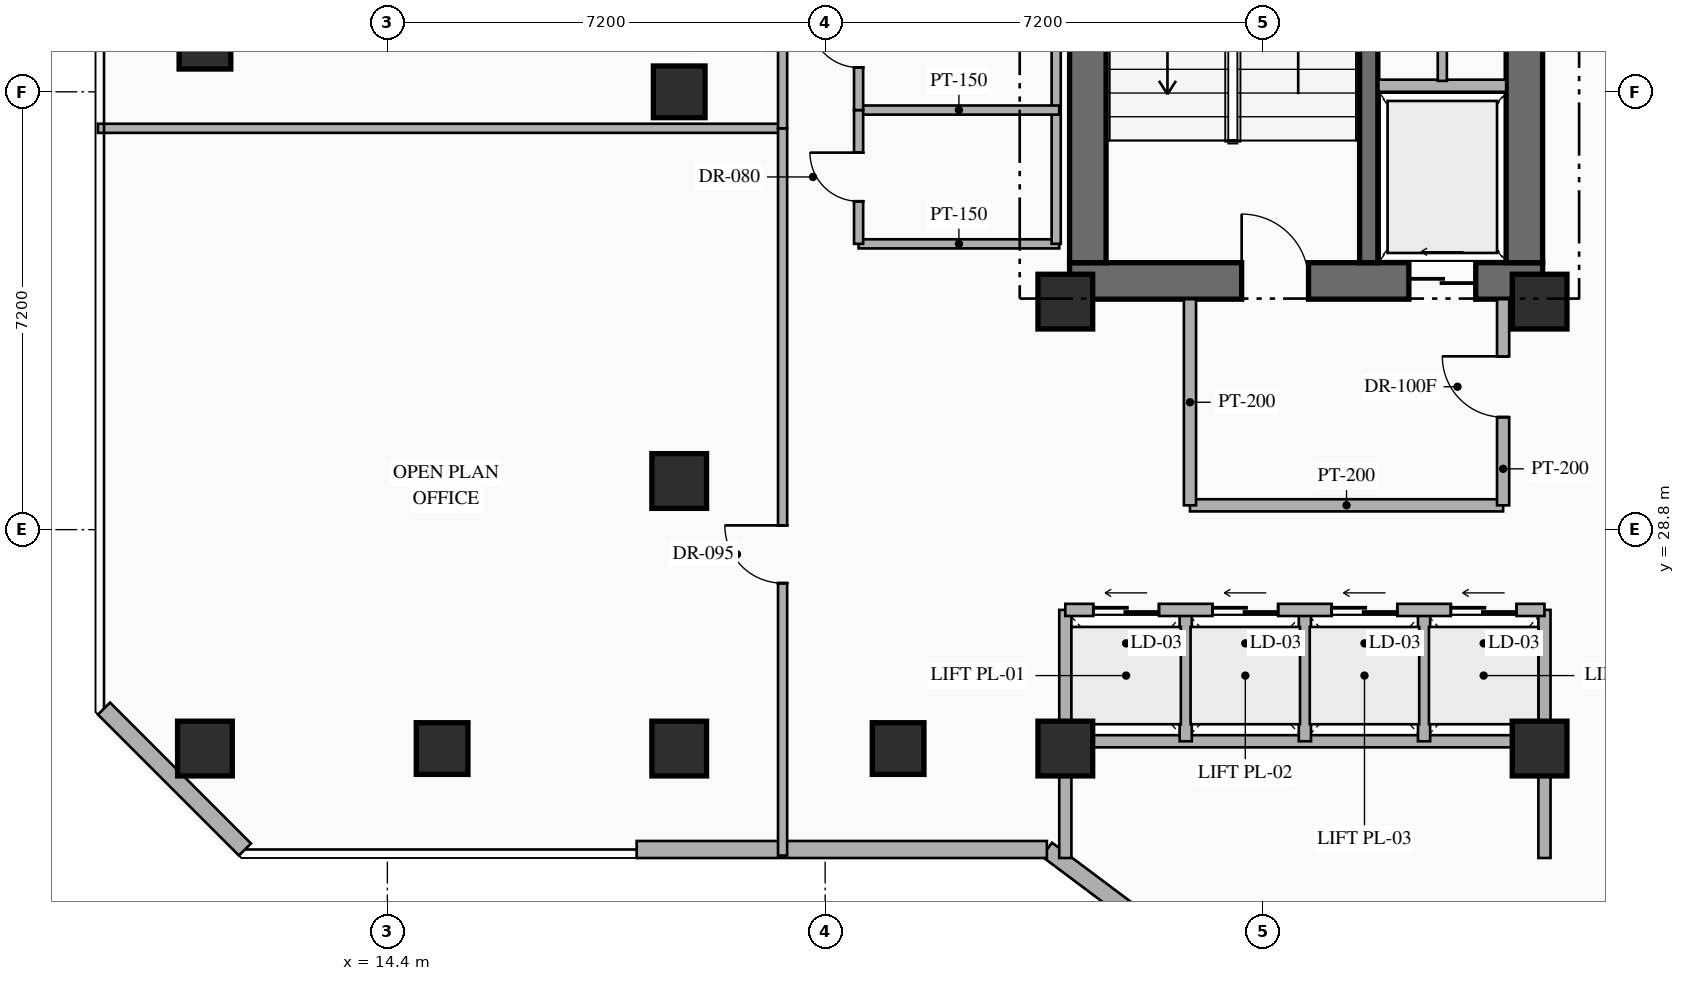
"""IFC4 building model, lengths in metres.
Left out: names, types, materials, properties, quantities, classifications, styles, units other than length and angle.
Written with IfcOpenShell. Run it as: python <this file> out.ifc"""

import sys

from ifc_helpers import new_model, si_unit, direction, frame, frame_2d, origin, origin_2d, place, context, subcontext, project, spatial, rectangle, hollow_rectangle, extrude, element, fill, save


model = new_model("IFC4")
c1 = context("Model", 3, precision=1e-05, world=origin(), true_north=direction((0.0, 1.0)))
c2 = subcontext(c1, "Body", "Model", "MODEL_VIEW")
j1 = project(units=[si_unit("LENGTHUNIT", "METRE"), si_unit("PLANEANGLEUNIT", "RADIAN")], contexts=[c1])
p1 = place(None, origin())
s1 = spatial("IfcSite", under=j1, at=p1, CompositionType="ELEMENT")
p2 = place(p1, origin())
s2 = spatial("IfcBuilding", under=s1, at=p2, CompositionType="ELEMENT")
p3 = place(p2, frame((0.0, 0.0, 96.45)))
s3 = spatial("IfcBuildingStorey", under=s2, at=p3, CompositionType="ELEMENT", Elevation=96.45)
p4 = place(p3, frame((25.62, 32.89, 0.0), z_axis=(0.0, 0.0, 1.0), x_axis=(1.0, 0.0, 0.0)))
e1 = element("IfcWall", 1, at=p4, inside=s3, PredefinedType="SHEAR", context=c2, shape_type="SweptSolid", body=[
    extrude(rectangle(XDim=7.78, YDim=0.6, at=frame_2d((3.89, 0.0))), origin(), (0.0, 0.0, 1.0), 4.8),
])
p5 = place(p4, frame((2.83, 0.0, 0.0)))
e2 = element("IfcOpeningElement", 2, at=p5, cuts=e1, PredefinedType="OPENING", context=c2, shape_type="SweptSolid", body=[
    extrude(rectangle(XDim=1.1, YDim=2.2, at=frame_2d((0.55, 1.1))), frame((0.0, 0.31, 0.0), z_axis=(0.0, -1.0, 0.0), x_axis=(1.0, 0.0, 0.0)), (0.0, 0.0, 1.0), 0.62),
])
p6 = place(p4, frame((5.58, 0.0, 0.0)))
e3 = element("IfcOpeningElement", 3, at=p6, cuts=e1, PredefinedType="OPENING", context=c2, shape_type="SweptSolid", body=[
    extrude(rectangle(XDim=1.1, YDim=2.15, at=frame_2d((0.55, 1.075))), frame((0.0, 0.31, 0.0), z_axis=(0.0, -1.0, 0.0), x_axis=(1.0, 0.0, 0.0)), (0.0, 0.0, 1.0), 0.62),
])
p7 = place(p3, frame((25.92, 33.19, 0.0), z_axis=(0.0, 0.0, 1.0), x_axis=(0.0, 1.0, 0.0)))
e4 = element("IfcWall", 4, at=p7, inside=s3, PredefinedType="SHEAR", context=c2, shape_type="SweptSolid", body=[
    extrude(rectangle(XDim=9.48, YDim=0.6, at=frame_2d((4.74, 0.0))), origin(), (0.0, 0.0, 1.0), 4.8),
])
p8 = place(p3, frame((33.1, 33.19, 0.0), z_axis=(0.0, 0.0, 1.0), x_axis=(0.0, 1.0, 0.0)))
e5 = element("IfcWall", 5, at=p8, inside=s3, PredefinedType="SHEAR", context=c2, shape_type="SweptSolid", body=[
    extrude(rectangle(XDim=9.48, YDim=0.6, at=frame_2d((4.74, 0.0))), origin(), (0.0, 0.0, 1.0), 4.8),
])
p9 = place(p8, frame((4.71, 0.0, 0.0)))
e6 = element("IfcOpeningElement", 6, at=p9, cuts=e5, PredefinedType="OPENING", context=c2, shape_type="SweptSolid", body=[
    extrude(rectangle(XDim=0.85, YDim=2.08, at=frame_2d((0.425, 1.04))), frame((0.0, 0.31, 0.0), z_axis=(0.0, -1.0, 0.0), x_axis=(1.0, 0.0, 0.0)), (0.0, 0.0, 1.0), 0.62),
])
p10 = place(p8, frame((7.76, 0.0, 0.0)))
e7 = element("IfcOpeningElement", 7, at=p10, cuts=e5, PredefinedType="OPENING", context=c2, shape_type="SweptSolid", body=[
    extrude(rectangle(XDim=0.85, YDim=2.08, at=frame_2d((0.425, 1.04))), frame((0.0, 0.31, 0.0), z_axis=(0.0, -1.0, 0.0), x_axis=(1.0, 0.0, 0.0)), (0.0, 0.0, 1.0), 0.62),
])
p11 = place(p3, frame((30.54, 33.19, 0.0), z_axis=(0.0, 0.0, 1.0), x_axis=(0.0, 1.0, 0.0)))
e8 = element("IfcWall", 8, at=p11, inside=s3, PredefinedType="SHEAR", context=c2, shape_type="SweptSolid", body=[
    extrude(rectangle(XDim=9.48, YDim=0.3, at=frame_2d((4.74, 0.0))), origin(), (0.0, 0.0, 1.0), 4.8),
])
for number, where, z_axis, x_axis in (
    (9, (25.55, 32.55, 0.0), (0.0, 0.0, 1.0), (1.0, 0.0, 0.0)),
    (10, (33.35, 32.55, 0.0), (0.0, 0.0, 1.0), (1.0, 0.0, 0.0)),
):
    element("IfcColumn", number, at=place(p3, frame(where, z_axis=z_axis, x_axis=x_axis)), inside=s3, PredefinedType="COLUMN", context=c2, shape_type="SweptSolid", body=[
        extrude(rectangle(XDim=0.9, YDim=0.9, at=origin_2d()), origin(), (0.0, 0.0, 1.0), 4.8),
    ])
for number, where, z_axis, x_axis in (
    (11, (25.55, 25.2, 0.0), (0.0, 0.0, 1.0), (1.0, 0.0, 0.0)),
    (12, (33.35, 25.2, 0.0), (0.0, 0.0, 1.0), (1.0, 0.0, 0.0)),
    (13, (11.4, 25.2, 0.0), (0.0, 0.0, 1.0), (1.0, 0.0, 0.0)),
    (14, (19.2, 25.2, 0.0), (0.0, 0.0, 1.0), (1.0, 0.0, 0.0)),
    (15, (19.2, 29.6, 0.0), (0.0, 0.0, 1.0), (1.0, 0.0, 0.0)),
):
    element("IfcColumn", number, at=place(p3, frame(where, z_axis=z_axis, x_axis=x_axis)), inside=s3, PredefinedType="COLUMN", context=c2, shape_type="SweptSolid", body=[
        extrude(hollow_rectangle(XDim=0.9, YDim=0.9, WallThickness=0.036, at=origin_2d()), origin(), (0.0, 0.0, 1.0), 4.8),
    ])
for number, where, z_axis, x_axis in (
    (16, (22.8, 25.2, 0.0), (0.0, 0.0, 1.0), (1.0, 0.0, 0.0)),
    (17, (11.4, 36.8, 0.0), (0.0, 0.0, 1.0), (1.0, 0.0, 0.0)),
    (18, (19.2, 36.0, 0.0), (0.0, 0.0, 1.0), (1.0, 0.0, 0.0)),
    (19, (15.3, 25.2, 0.0), (0.0, 0.0, 1.0), (1.0, 0.0, 0.0)),
):
    element("IfcColumn", number, at=place(p3, frame(where, z_axis=z_axis, x_axis=x_axis)), inside=s3, PredefinedType="COLUMN", context=c2, shape_type="SweptSolid", body=[
        extrude(hollow_rectangle(XDim=0.85, YDim=0.85, WallThickness=0.032, at=origin_2d()), origin(), (0.0, 0.0, 1.0), 4.8),
    ])
p12 = place(p3, frame((53.318, 2.487, 0.0), z_axis=(0.0, 0.0, 1.0), x_axis=(-0.800004174678, 0.599994433723, 0.0)))
e20 = element("IfcWall", 20, at=p12, inside=s3, PredefinedType="STANDARD", context=c2, shape_type="SweptSolid", body=[
    extrude(rectangle(XDim=35.089, YDim=0.28, at=frame_2d((17.544, 0.0))), origin(), (0.0, 0.0, 1.0), 4.55),
])
p13 = place(p3, frame((25.247, 23.54, 0.0), z_axis=(0.0, 0.0, 1.0), x_axis=(-1.0, 0.0, 0.0)))
e21 = element("IfcWall", 21, at=p13, inside=s3, PredefinedType="STANDARD", context=c2, shape_type="SweptSolid", body=[
    extrude(rectangle(XDim=6.747, YDim=0.28, at=frame_2d((3.374, 0.0))), origin(), (0.0, 0.0, 1.0), 4.55),
])
p14 = place(p3, frame((12.058, 23.54, 0.0), z_axis=(0.0, 0.0, 1.0), x_axis=(-0.707144017911, 0.707069542501, 0.0)))
e22 = element("IfcWall", 22, at=p14, inside=s3, PredefinedType="STANDARD", context=c2, shape_type="SweptSolid", body=[
    extrude(rectangle(XDim=3.278, YDim=0.28, at=frame_2d((1.639, 0.0))), origin(), (0.0, 0.0, 1.0), 4.55),
])
p15 = place(p3, frame((30.7, 36.1, 0.0), z_axis=(0.0, 0.0, 1.0), x_axis=(1.0, 0.0, 0.0)))
e23 = element("IfcWall", 23, at=p15, inside=s3, PredefinedType="STANDARD", context=c2, shape_type="SweptSolid", body=[
    extrude(rectangle(XDim=2.1, YDim=0.2, at=frame_2d((1.05, 0.0))), origin(), (0.0, 0.0, 1.0), 4.55),
])
p16 = place(p3, frame((31.75, 36.18, 0.0), z_axis=(0.0, 0.0, 1.0), x_axis=(0.0, 1.0, 0.0)))
e24 = element("IfcWall", 24, at=p16, inside=s3, PredefinedType="PARTITIONING", context=c2, shape_type="SweptSolid", body=[
    extrude(rectangle(XDim=4.24, YDim=0.15, at=frame_2d((2.12, 0.0))), origin(), (0.0, 0.0, 1.0), 4.55),
])
p17 = place(p16, frame((1.695, 0.0, 0.0)))
e25 = element("IfcOpeningElement", 25, at=p17, cuts=e24, PredefinedType="OPENING", context=c2, shape_type="SweptSolid", body=[
    extrude(rectangle(XDim=0.85, YDim=2.08, at=frame_2d((0.425, 1.04))), frame((0.0, 0.085, 0.0), z_axis=(0.0, -1.0, 0.0), x_axis=(1.0, 0.0, 0.0)), (0.0, 0.0, 1.0), 0.17),
])
p18 = place(p3, frame((27.6, 29.2, 0.0), z_axis=(0.0, 0.0, 1.0), x_axis=(1.0, 0.0, 0.0)))
e26 = element("IfcWall", 26, at=p18, inside=s3, PredefinedType="STANDARD", context=c2, shape_type="SweptSolid", body=[
    extrude(rectangle(XDim=5.15, YDim=0.2, at=frame_2d((2.575, 0.0))), origin(), (0.0, 0.0, 1.0), 4.55),
])
p19 = place(p3, frame((27.6, 29.2, 0.0), z_axis=(0.0, 0.0, 1.0), x_axis=(0.0, 1.0, 0.0)))
e27 = element("IfcWall", 27, at=p19, inside=s3, PredefinedType="STANDARD", context=c2, shape_type="SweptSolid", body=[
    extrude(rectangle(XDim=3.39, YDim=0.2, at=frame_2d((1.695, 0.0))), origin(), (0.0, 0.0, 1.0), 4.55),
])
p20 = place(p3, frame((32.75, 29.2, 0.0), z_axis=(0.0, 0.0, 1.0), x_axis=(0.0, 1.0, 0.0)))
e28 = element("IfcWall", 28, at=p20, inside=s3, PredefinedType="STANDARD", context=c2, shape_type="SweptSolid", body=[
    extrude(rectangle(XDim=3.39, YDim=0.2, at=frame_2d((1.695, 0.0))), origin(), (0.0, 0.0, 1.0), 4.55),
])
p21 = place(p20, frame((1.45, 0.0, 0.0)))
e29 = element("IfcOpeningElement", 29, at=p21, cuts=e28, PredefinedType="OPENING", context=c2, shape_type="SweptSolid", body=[
    extrude(rectangle(XDim=1.0, YDim=2.2, at=frame_2d((0.5, 1.1))), frame((0.0, 0.11, 0.0), z_axis=(0.0, -1.0, 0.0), x_axis=(1.0, 0.0, 0.0)), (0.0, 0.0, 1.0), 0.22),
])
for number, where, z_axis, x_axis in (
    (30, (25.55, 23.4, 0.0), (0.0, 0.0, 1.0), (0.0, 1.0, 0.0)),
    (31, (33.43, 23.4, 0.0), (0.0, 0.0, 1.0), (0.0, 1.0, 0.0)),
):
    element("IfcWall", number, at=place(p3, frame(where, z_axis=z_axis, x_axis=x_axis)), inside=s3, PredefinedType="STANDARD", context=c2, shape_type="SweptSolid", body=[
        extrude(rectangle(XDim=4.08, YDim=0.2, at=frame_2d((2.04, 0.0))), origin(), (0.0, 0.0, 1.0), 3.745),
    ])
p22 = place(p3, frame((25.55, 25.32, 0.0), z_axis=(0.0, 0.0, 1.0), x_axis=(1.0, 0.0, 0.0)))
e32 = element("IfcWall", 32, at=p22, inside=s3, PredefinedType="STANDARD", context=c2, shape_type="SweptSolid", body=[
    extrude(rectangle(XDim=7.88, YDim=0.2, at=frame_2d((3.94, 0.0))), origin(), (0.0, 0.0, 1.0), 3.945),
])
for number, where, z_axis, x_axis in (
    (33, (27.53, 25.32, 0.0), (0.0, 0.0, 1.0), (0.0, 1.0, 0.0)),
    (34, (29.49, 25.32, 0.0), (0.0, 0.0, 1.0), (0.0, 1.0, 0.0)),
    (35, (31.45, 25.32, 0.0), (0.0, 0.0, 1.0), (0.0, 1.0, 0.0)),
):
    element("IfcWall", number, at=place(p3, frame(where, z_axis=z_axis, x_axis=x_axis)), inside=s3, PredefinedType="STANDARD", context=c2, shape_type="SweptSolid", body=[
        extrude(rectangle(XDim=2.16, YDim=0.2, at=frame_2d((1.08, 0.0))), origin(), (0.0, 0.0, 1.0), 4.55),
    ])
p23 = place(p3, frame((25.55, 27.48, 0.0), z_axis=(0.0, 0.0, 1.0), x_axis=(1.0, 0.0, 0.0)))
e36 = element("IfcWall", 36, at=p23, inside=s3, PredefinedType="STANDARD", context=c2, shape_type="SweptSolid", body=[
    extrude(rectangle(XDim=7.88, YDim=0.2, at=frame_2d((3.94, 0.0))), origin(), (0.0, 0.0, 1.0), 4.55),
])
p24 = place(p23, frame((0.46, 0.0, 0.0)))
e37 = element("IfcOpeningElement", 37, at=p24, cuts=e36, PredefinedType="OPENING", context=c2, shape_type="SweptSolid", body=[
    extrude(rectangle(XDim=1.08, YDim=2.15, at=frame_2d((0.54, 1.075))), frame((0.0, 0.11, 0.0), z_axis=(0.0, -1.0, 0.0), x_axis=(1.0, 0.0, 0.0)), (0.0, 0.0, 1.0), 0.22),
])
p25 = place(p23, frame((2.42, 0.0, 0.0)))
e38 = element("IfcOpeningElement", 38, at=p25, cuts=e36, PredefinedType="OPENING", context=c2, shape_type="SweptSolid", body=[
    extrude(rectangle(XDim=1.08, YDim=2.15, at=frame_2d((0.54, 1.075))), frame((0.0, 0.11, 0.0), z_axis=(0.0, -1.0, 0.0), x_axis=(1.0, 0.0, 0.0)), (0.0, 0.0, 1.0), 0.22),
])
p26 = place(p23, frame((4.38, 0.0, 0.0)))
e39 = element("IfcOpeningElement", 39, at=p26, cuts=e36, PredefinedType="OPENING", context=c2, shape_type="SweptSolid", body=[
    extrude(rectangle(XDim=1.08, YDim=2.15, at=frame_2d((0.54, 1.075))), frame((0.0, 0.11, 0.0), z_axis=(0.0, -1.0, 0.0), x_axis=(1.0, 0.0, 0.0)), (0.0, 0.0, 1.0), 0.22),
])
p27 = place(p23, frame((6.34, 0.0, 0.0)))
e40 = element("IfcOpeningElement", 40, at=p27, cuts=e36, PredefinedType="OPENING", context=c2, shape_type="SweptSolid", body=[
    extrude(rectangle(XDim=1.08, YDim=2.15, at=frame_2d((0.54, 1.075))), frame((0.0, 0.11, 0.0), z_axis=(0.0, -1.0, 0.0), x_axis=(1.0, 0.0, 0.0)), (0.0, 0.0, 1.0), 0.22),
])
p28 = place(p3, frame((22.15, 33.5, 0.0), z_axis=(0.0, 0.0, 1.0), x_axis=(1.0, 0.0, 0.0)))
e41 = element("IfcWall", 41, at=p28, inside=s3, PredefinedType="PARTITIONING", context=c2, shape_type="SweptSolid", body=[
    extrude(rectangle(XDim=3.3, YDim=0.15, at=frame_2d((1.65, 0.0))), origin(), (0.0, 0.0, 1.0), 4.55),
])
p29 = place(p3, frame((25.4, 33.5, 0.0), z_axis=(0.0, 0.0, 1.0), x_axis=(0.0, 1.0, 0.0)))
e42 = element("IfcWall", 42, at=p29, inside=s3, PredefinedType="PARTITIONING", context=c2, shape_type="SweptSolid", body=[
    extrude(rectangle(XDim=6.6, YDim=0.15, at=frame_2d((3.3, 0.0))), origin(), (0.0, 0.0, 1.0), 4.55),
])
p30 = place(p3, frame((22.15, 35.7, 0.0), z_axis=(0.0, 0.0, 1.0), x_axis=(1.0, 0.0, 0.0)))
e43 = element("IfcWall", 43, at=p30, inside=s3, PredefinedType="PARTITIONING", context=c2, shape_type="SweptSolid", body=[
    extrude(rectangle(XDim=3.3, YDim=0.15, at=frame_2d((1.65, 0.0))), origin(), (0.0, 0.0, 1.0), 4.55),
])
p31 = place(p3, frame((22.15, 33.5, 0.0), z_axis=(0.0, 0.0, 1.0), x_axis=(0.0, 1.0, 0.0)))
e44 = element("IfcWall", 44, at=p31, inside=s3, PredefinedType="PARTITIONING", context=c2, shape_type="SweptSolid", body=[
    extrude(rectangle(XDim=2.2, YDim=0.15, at=frame_2d((1.1, 0.0))), origin(), (0.0, 0.0, 1.0), 4.55),
])
p32 = place(p31, frame((0.7, 0.0, 0.0)))
e45 = element("IfcOpeningElement", 45, at=p32, cuts=e44, PredefinedType="OPENING", context=c2, shape_type="SweptSolid", body=[
    extrude(rectangle(XDim=0.8, YDim=2.06, at=frame_2d((0.4, 1.03))), frame((0.0, 0.085, 0.0), z_axis=(0.0, -1.0, 0.0), x_axis=(1.0, 0.0, 0.0)), (0.0, 0.0, 1.0), 0.17),
])
p33 = place(p3, frame((22.15, 35.7, 0.0), z_axis=(0.0, 0.0, 1.0), x_axis=(0.0, 1.0, 0.0)))
e46 = element("IfcWall", 46, at=p33, inside=s3, PredefinedType="PARTITIONING", context=c2, shape_type="SweptSolid", body=[
    extrude(rectangle(XDim=2.2, YDim=0.15, at=frame_2d((1.1, 0.0))), origin(), (0.0, 0.0, 1.0), 4.55),
])
p34 = place(p33, frame((0.7, 0.0, 0.0)))
e47 = element("IfcOpeningElement", 47, at=p34, cuts=e46, PredefinedType="OPENING", context=c2, shape_type="SweptSolid", body=[
    extrude(rectangle(XDim=0.8, YDim=2.06, at=frame_2d((0.4, 1.03))), frame((0.0, 0.085, 0.0), z_axis=(0.0, -1.0, 0.0), x_axis=(1.0, 0.0, 0.0)), (0.0, 0.0, 1.0), 0.17),
])
p35 = place(p3, frame((9.64, 35.4, 0.0), z_axis=(0.0, 0.0, 1.0), x_axis=(1.0, 0.0, 0.0)))
e48 = element("IfcWall", 48, at=p35, inside=s3, PredefinedType="PARTITIONING", context=c2, shape_type="SweptSolid", body=[
    extrude(rectangle(XDim=11.26, YDim=0.15, at=frame_2d((5.63, 0.0))), origin(), (0.0, 0.0, 1.0), 4.55),
])
p36 = place(p3, frame((20.9, 23.44, 0.0), z_axis=(0.0, 0.0, 1.0), x_axis=(0.0, 1.0, 0.0)))
e49 = element("IfcWall", 49, at=p36, inside=s3, PredefinedType="PARTITIONING", context=c2, shape_type="SweptSolid", body=[
    extrude(rectangle(XDim=11.96, YDim=0.15, at=frame_2d((5.98, 0.0))), origin(), (0.0, 0.0, 1.0), 4.55),
])
p37 = place(p36, frame((4.48, 0.0, 0.0)))
e50 = element("IfcOpeningElement", 50, at=p37, cuts=e49, PredefinedType="OPENING", context=c2, shape_type="SweptSolid", body=[
    extrude(rectangle(XDim=0.95, YDim=2.15, at=frame_2d((0.475, 1.075))), frame((0.0, 0.085, 0.0), z_axis=(0.0, -1.0, 0.0), x_axis=(1.0, 0.0, 0.0)), (0.0, 0.0, 1.0), 0.17),
])
p38 = place(p3, frame((20.9, 35.4, 0.0), z_axis=(0.0, 0.0, 1.0), x_axis=(0.0, 1.0, 0.0)))
e51 = element("IfcWall", 51, at=p38, inside=s3, PredefinedType="PARTITIONING", context=c2, shape_type="SweptSolid", body=[
    extrude(rectangle(XDim=14.96, YDim=0.15, at=frame_2d((7.48, 0.0))), origin(), (0.0, 0.0, 1.0), 4.55),
])
p39 = place(p38, frame((7.667, 0.0, 0.0)))
e52 = element("IfcOpeningElement", 52, at=p39, cuts=e51, PredefinedType="OPENING", context=c2, shape_type="SweptSolid", body=[
    extrude(rectangle(XDim=0.95, YDim=2.15, at=frame_2d((0.475, 1.075))), frame((0.0, 0.085, 0.0), z_axis=(0.0, -1.0, 0.0), x_axis=(1.0, 0.0, 0.0)), (0.0, 0.0, 1.0), 0.17),
])
p40 = place(p5, origin())
e53 = element("IfcDoor", 53, at=p40, inside=s3, OperationType="SINGLE_SWING_LEFT", PredefinedType="DOOR", context=c2, shape_type="SweptSolid", body=[
    extrude(rectangle(XDim=1.1, YDim=2.2, at=frame_2d((0.55, 1.1))), frame((0.0, 0.025, 0.0), z_axis=(0.0, -1.0, 0.0), x_axis=(1.0, 0.0, 0.0)), (0.0, 0.0, 1.0), 0.05),
])
fill(e2, e53)
p41 = place(p6, origin())
e54 = element("IfcDoor", 54, at=p41, inside=s3, OperationType="SLIDING_TO_LEFT", PredefinedType="USERDEFINED", context=c2, shape_type="SweptSolid", body=[
    extrude(rectangle(XDim=1.1, YDim=2.15, at=frame_2d((0.55, 1.075))), frame((0.0, 0.025, 0.0), z_axis=(0.0, -1.0, 0.0), x_axis=(1.0, 0.0, 0.0)), (0.0, 0.0, 1.0), 0.05),
])
fill(e3, e54)
p42 = place(p21, origin())
e55 = element("IfcDoor", 55, at=p42, inside=s3, OperationType="SINGLE_SWING_RIGHT", PredefinedType="DOOR", context=c2, shape_type="SweptSolid", body=[
    extrude(rectangle(XDim=1.0, YDim=2.2, at=frame_2d((0.5, 1.1))), frame((0.0, 0.025, 0.0), z_axis=(0.0, -1.0, 0.0), x_axis=(1.0, 0.0, 0.0)), (0.0, 0.0, 1.0), 0.05),
])
fill(e29, e55)
p43 = place(p24, origin())
e56 = element("IfcDoor", 56, at=p43, inside=s3, OperationType="SLIDING_TO_LEFT", PredefinedType="USERDEFINED", context=c2, shape_type="SweptSolid", body=[
    extrude(rectangle(XDim=1.08, YDim=2.15, at=frame_2d((0.54, 1.075))), frame((0.0, 0.025, 0.0), z_axis=(0.0, -1.0, 0.0), x_axis=(1.0, 0.0, 0.0)), (0.0, 0.0, 1.0), 0.05),
])
fill(e37, e56)
p44 = place(p25, origin())
e57 = element("IfcDoor", 57, at=p44, inside=s3, OperationType="SLIDING_TO_LEFT", PredefinedType="USERDEFINED", context=c2, shape_type="SweptSolid", body=[
    extrude(rectangle(XDim=1.08, YDim=2.15, at=frame_2d((0.54, 1.075))), frame((0.0, 0.025, 0.0), z_axis=(0.0, -1.0, 0.0), x_axis=(1.0, 0.0, 0.0)), (0.0, 0.0, 1.0), 0.05),
])
fill(e38, e57)
p45 = place(p26, origin())
e58 = element("IfcDoor", 58, at=p45, inside=s3, OperationType="SLIDING_TO_LEFT", PredefinedType="USERDEFINED", context=c2, shape_type="SweptSolid", body=[
    extrude(rectangle(XDim=1.08, YDim=2.15, at=frame_2d((0.54, 1.075))), frame((0.0, 0.025, 0.0), z_axis=(0.0, -1.0, 0.0), x_axis=(1.0, 0.0, 0.0)), (0.0, 0.0, 1.0), 0.05),
])
fill(e39, e58)
p46 = place(p27, origin())
e59 = element("IfcDoor", 59, at=p46, inside=s3, OperationType="SLIDING_TO_LEFT", PredefinedType="USERDEFINED", context=c2, shape_type="SweptSolid", body=[
    extrude(rectangle(XDim=1.08, YDim=2.15, at=frame_2d((0.54, 1.075))), frame((0.0, 0.025, 0.0), z_axis=(0.0, -1.0, 0.0), x_axis=(1.0, 0.0, 0.0)), (0.0, 0.0, 1.0), 0.05),
])
fill(e40, e59)
p47 = place(p32, origin())
e60 = element("IfcDoor", 60, at=p47, inside=s3, OperationType="SINGLE_SWING_RIGHT", PredefinedType="DOOR", context=c2, shape_type="SweptSolid", body=[
    extrude(rectangle(XDim=0.8, YDim=2.06, at=frame_2d((0.4, 1.03))), frame((0.0, 0.025, 0.0), z_axis=(0.0, -1.0, 0.0), x_axis=(1.0, 0.0, 0.0)), (0.0, 0.0, 1.0), 0.05),
])
fill(e45, e60)
p48 = place(p34, origin())
e61 = element("IfcDoor", 61, at=p48, inside=s3, OperationType="SINGLE_SWING_RIGHT", PredefinedType="DOOR", context=c2, shape_type="SweptSolid", body=[
    extrude(rectangle(XDim=0.8, YDim=2.06, at=frame_2d((0.4, 1.03))), frame((0.0, 0.025, 0.0), z_axis=(0.0, -1.0, 0.0), x_axis=(1.0, 0.0, 0.0)), (0.0, 0.0, 1.0), 0.05),
])
fill(e47, e61)
p49 = place(p37, origin())
e62 = element("IfcDoor", 62, at=p49, inside=s3, OperationType="SINGLE_SWING_RIGHT", PredefinedType="DOOR", context=c2, shape_type="SweptSolid", body=[
    extrude(rectangle(XDim=0.95, YDim=2.15, at=frame_2d((0.475, 1.075))), frame((0.0, 0.025, 0.0), z_axis=(0.0, -1.0, 0.0), x_axis=(1.0, 0.0, 0.0)), (0.0, 0.0, 1.0), 0.05),
])
fill(e50, e62)
save(model, sys.argv[1])
